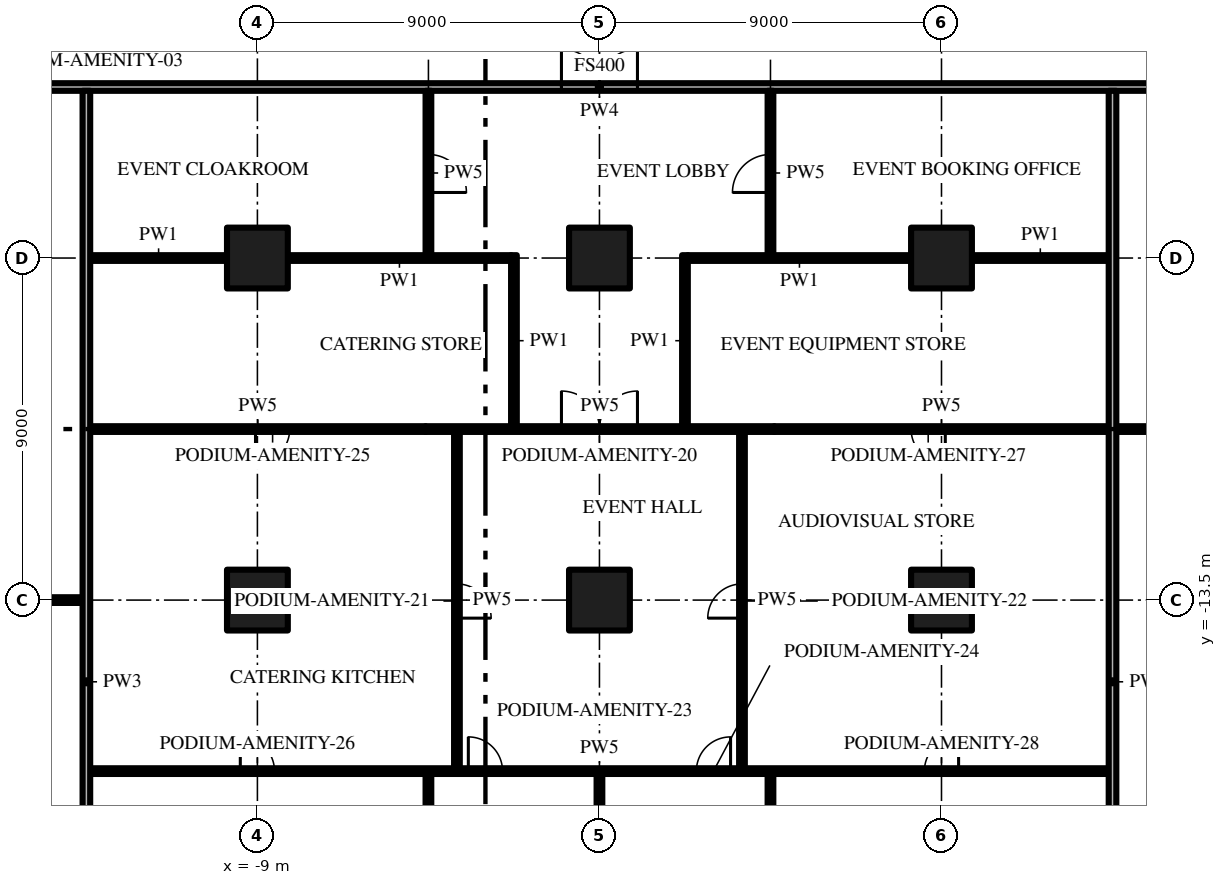
"""IFC4 building model, lengths in metres.
Left out: names, types, materials, properties, quantities, classifications, styles, units other than length and angle.
Written with IfcOpenShell. Run it as: python <this file> out.ifc"""

import sys

from ifc_helpers import new_model, si_unit, direction, frame, frame_2d, origin, origin_2d, place, context, subcontext, project, spatial, rectangle, extrude, element, fill, save


model = new_model("IFC4")
c1 = context("Model", 3, precision=1e-05, world=origin(), true_north=direction((0.0, 1.0)))
c2 = subcontext(c1, "Body", "Model", "MODEL_VIEW")
j1 = project(units=[si_unit("LENGTHUNIT", "METRE"), si_unit("PLANEANGLEUNIT", "RADIAN")], contexts=[c1])
p1 = place(None, origin())
s1 = spatial("IfcSite", under=j1, at=p1, CompositionType="ELEMENT")
p2 = place(p1, origin())
s2 = spatial("IfcBuilding", under=s1, at=p2, CompositionType="ELEMENT")
p3 = place(p2, frame((0.0, 0.0, 6.0)))
s3 = spatial("IfcBuildingStorey", under=s2, at=p3, CompositionType="ELEMENT", Elevation=6.0)
for number, where, z_axis, x_axis in (
    (1, (-9.0, -13.5, 0.0), (0.0, 0.0, 1.0), (1.0, 0.0, 0.0)),
    (2, (-9.0, -4.5, 0.0), (0.0, 0.0, 1.0), (1.0, 0.0, 0.0)),
    (3, (0.0, -13.5, 0.0), (0.0, 0.0, 1.0), (1.0, 0.0, 0.0)),
    (4, (0.0, -4.5, 0.0), (0.0, 0.0, 1.0), (1.0, 0.0, 0.0)),
    (5, (9.0, -13.5, 0.0), (0.0, 0.0, 1.0), (1.0, 0.0, 0.0)),
    (6, (9.0, -4.5, 0.0), (0.0, 0.0, 1.0), (1.0, 0.0, 0.0)),
):
    element("IfcColumn", number, at=place(p3, frame(where, z_axis=z_axis, x_axis=x_axis)), inside=s3, PredefinedType="COLUMN", context=c2, shape_type="SweptSolid", body=[
        extrude(rectangle(XDim=1.6, YDim=1.6, at=origin_2d()), origin(), (0.0, 0.0, 1.0), 4.15),
    ])
p4 = place(p3, frame((-13.4, -18.0, 0.0), z_axis=(0.0, 0.0, 1.0), x_axis=(1.0, 0.0, 0.0)))
e7 = element("IfcWall", 7, at=p4, inside=s3, PredefinedType="PARTITIONING", context=c2, shape_type="SweptSolid", body=[
    extrude(rectangle(XDim=26.8, YDim=0.15, at=frame_2d((13.4, 0.0))), origin(), (0.0, 0.0, 1.0), 4.15),
])
p5 = place(p4, frame((9.95, 0.0, 0.0)))
e8 = element("IfcOpeningElement", 8, at=p5, cuts=e7, PredefinedType="OPENING", context=c2, shape_type="SweptSolid", body=[
    extrude(rectangle(XDim=0.9, YDim=2.1, at=frame_2d((0.45, 1.05))), frame((0.0, 0.085, 0.0), z_axis=(0.0, -1.0, 0.0), x_axis=(1.0, 0.0, 0.0)), (0.0, 0.0, 1.0), 0.17),
])
p6 = place(p4, frame((15.95, 0.0, 0.0)))
e9 = element("IfcOpeningElement", 9, at=p6, cuts=e7, PredefinedType="OPENING", context=c2, shape_type="SweptSolid", body=[
    extrude(rectangle(XDim=0.9, YDim=2.1, at=frame_2d((0.45, 1.05))), frame((0.0, 0.085, 0.0), z_axis=(0.0, -1.0, 0.0), x_axis=(1.0, 0.0, 0.0)), (0.0, 0.0, 1.0), 0.17),
])
p7 = place(p4, frame((3.95, 0.0, 0.0)))
e10 = element("IfcOpeningElement", 10, at=p7, cuts=e7, PredefinedType="OPENING", context=c2, shape_type="SweptSolid", body=[
    extrude(rectangle(XDim=0.9, YDim=2.1, at=frame_2d((0.45, 1.05))), frame((0.0, 0.085, 0.0), z_axis=(0.0, -1.0, 0.0), x_axis=(1.0, 0.0, 0.0)), (0.0, 0.0, 1.0), 0.17),
])
p8 = place(p4, frame((21.95, 0.0, 0.0)))
e11 = element("IfcOpeningElement", 11, at=p8, cuts=e7, PredefinedType="OPENING", context=c2, shape_type="SweptSolid", body=[
    extrude(rectangle(XDim=0.9, YDim=2.1, at=frame_2d((0.45, 1.05))), frame((0.0, 0.085, 0.0), z_axis=(0.0, -1.0, 0.0), x_axis=(1.0, 0.0, 0.0)), (0.0, 0.0, 1.0), 0.17),
])
p9 = place(p3, frame((-17.2, -13.5, 0.0), z_axis=(0.0, 0.0, 1.0), x_axis=(1.0, 0.0, 0.0)))
e12 = element("IfcWall", 12, at=p9, inside=s3, PredefinedType="PARTITIONING", context=c2, shape_type="SweptSolid", body=[
    extrude(rectangle(XDim=3.6, YDim=0.15, at=frame_2d((1.8, 0.0))), origin(), (0.0, 0.0, 1.0), 4.15),
])
p10 = place(p3, frame((-4.575, -9.0, 0.0), z_axis=(0.0, 0.0, 1.0), x_axis=(-1.0, 0.0, 0.0)))
e13 = element("IfcWall", 13, at=p10, inside=s3, PredefinedType="PARTITIONING", context=c2, shape_type="SweptSolid", body=[
    extrude(rectangle(XDim=8.825, YDim=0.15, at=frame_2d((4.412, 0.0))), origin(), (0.0, 0.0, 1.0), 4.15),
])
p11 = place(p10, frame((3.575, 0.0, 0.0)))
e14 = element("IfcOpeningElement", 14, at=p11, cuts=e13, PredefinedType="OPENING", context=c2, shape_type="SweptSolid", body=[
    extrude(rectangle(XDim=0.9, YDim=2.1, at=frame_2d((0.45, 1.05))), frame((0.0, 0.085, 0.0), z_axis=(0.0, -1.0, 0.0), x_axis=(1.0, 0.0, 0.0)), (0.0, 0.0, 1.0), 0.17),
])
p12 = place(p3, frame((-4.575, -9.0, 0.0), z_axis=(0.0, 0.0, 1.0), x_axis=(1.0, 0.0, 0.0)))
e15 = element("IfcWall", 15, at=p12, inside=s3, PredefinedType="PARTITIONING", context=c2, shape_type="SweptSolid", body=[
    extrude(rectangle(XDim=9.175, YDim=0.15, at=frame_2d((4.588, 0.0))), origin(), (0.0, 0.0, 1.0), 4.15),
])
p13 = place(p12, frame((3.575, 0.0, 0.0)))
e16 = element("IfcOpeningElement", 16, at=p13, cuts=e15, PredefinedType="OPENING", context=c2, shape_type="SweptSolid", body=[
    extrude(rectangle(XDim=2.0, YDim=2.4, at=frame_2d((1.0, 1.2))), frame((0.0, 0.085, 0.0), z_axis=(0.0, -1.0, 0.0), x_axis=(1.0, 0.0, 0.0)), (0.0, 0.0, 1.0), 0.17),
])
p14 = place(p3, frame((13.4, -9.0, 0.0), z_axis=(0.0, 0.0, 1.0), x_axis=(-1.0, 0.0, 0.0)))
e17 = element("IfcWall", 17, at=p14, inside=s3, PredefinedType="PARTITIONING", context=c2, shape_type="SweptSolid", body=[
    extrude(rectangle(XDim=8.8, YDim=0.15, at=frame_2d((4.4, 0.0))), origin(), (0.0, 0.0, 1.0), 4.15),
])
p15 = place(p14, frame((4.3, 0.0, 0.0)))
e18 = element("IfcOpeningElement", 18, at=p15, cuts=e17, PredefinedType="OPENING", context=c2, shape_type="SweptSolid", body=[
    extrude(rectangle(XDim=0.9, YDim=2.1, at=frame_2d((0.45, 1.05))), frame((0.0, 0.085, 0.0), z_axis=(0.0, -1.0, 0.0), x_axis=(1.0, 0.0, 0.0)), (0.0, 0.0, 1.0), 0.17),
])
p16 = place(p3, frame((13.6, -9.0, 0.0), z_axis=(0.0, 0.0, 1.0), x_axis=(1.0, 0.0, 0.0)))
e19 = element("IfcWall", 19, at=p16, inside=s3, PredefinedType="PARTITIONING", context=c2, shape_type="SweptSolid", body=[
    extrude(rectangle(XDim=22.1, YDim=0.15, at=frame_2d((11.05, 0.0))), origin(), (0.0, 0.0, 1.0), 4.15),
])
p17 = place(p16, frame((10.65, 0.0, 0.0)))
e20 = element("IfcOpeningElement", 20, at=p17, cuts=e19, PredefinedType="OPENING", context=c2, shape_type="SweptSolid", body=[
    extrude(rectangle(XDim=1.0, YDim=2.4, at=frame_2d((0.5, 1.2))), frame((0.0, 0.085, 0.0), z_axis=(0.0, -1.0, 0.0), x_axis=(1.0, 0.0, 0.0)), (0.0, 0.0, 1.0), 0.17),
])
p18 = place(p3, frame((-13.4, -4.5, 0.0), z_axis=(0.0, 0.0, 1.0), x_axis=(1.0, 0.0, 0.0)))
e21 = element("IfcWall", 21, at=p18, inside=s3, PredefinedType="PARTITIONING", context=c2, shape_type="SweptSolid", body=[
    extrude(rectangle(XDim=3.6, YDim=0.15, at=frame_2d((1.8, 0.0))), origin(), (0.0, 0.0, 1.0), 4.15),
])
for number, where, z_axis, x_axis in (
    (22, (-8.2, -4.5, 0.0), (0.0, 0.0, 1.0), (1.0, 0.0, 0.0)),
    (23, (2.325, -4.5, 0.0), (0.0, 0.0, 1.0), (1.0, 0.0, 0.0)),
):
    element("IfcWall", number, at=place(p3, frame(where, z_axis=z_axis, x_axis=x_axis)), inside=s3, PredefinedType="PARTITIONING", context=c2, shape_type="SweptSolid", body=[
        extrude(rectangle(XDim=5.875, YDim=0.15, at=frame_2d((2.938, 0.0))), origin(), (0.0, 0.0, 1.0), 4.15),
    ])
p19 = place(p3, frame((9.8, -4.5, 0.0), z_axis=(0.0, 0.0, 1.0), x_axis=(1.0, 0.0, 0.0)))
e24 = element("IfcWall", 24, at=p19, inside=s3, PredefinedType="PARTITIONING", context=c2, shape_type="SweptSolid", body=[
    extrude(rectangle(XDim=3.6, YDim=0.15, at=frame_2d((1.8, 0.0))), origin(), (0.0, 0.0, 1.0), 4.15),
])
p20 = place(p3, frame((-17.4, 0.0, 0.0), z_axis=(0.0, 0.0, 1.0), x_axis=(1.0, 0.0, 0.0)))
e25 = element("IfcWall", 25, at=p20, inside=s3, PredefinedType="PARTITIONING", context=c2, shape_type="SweptSolid", body=[
    extrude(rectangle(XDim=34.8, YDim=0.2, at=frame_2d((17.4, 0.0))), origin(), (0.0, 0.0, 1.0), 4.15),
])
p21 = place(p20, frame((0.9, 0.0, 0.0)))
e26 = element("IfcOpeningElement", 26, at=p21, cuts=e25, PredefinedType="OPENING", context=c2, shape_type="SweptSolid", body=[
    extrude(rectangle(XDim=2.0, YDim=2.4, at=frame_2d((1.0, 1.2))), frame((0.0, 0.11, 0.0), z_axis=(0.0, -1.0, 0.0), x_axis=(1.0, 0.0, 0.0)), (0.0, 0.0, 1.0), 0.22),
])
p22 = place(p20, frame((16.4, 0.0, 0.0)))
e27 = element("IfcOpeningElement", 27, at=p22, cuts=e25, PredefinedType="OPENING", context=c2, shape_type="SweptSolid", body=[
    extrude(rectangle(XDim=2.0, YDim=2.4, at=frame_2d((1.0, 1.2))), frame((0.0, 0.11, 0.0), z_axis=(0.0, -1.0, 0.0), x_axis=(1.0, 0.0, 0.0)), (0.0, 0.0, 1.0), 0.22),
])
p23 = place(p20, frame((32.0, 0.0, 0.0)))
e28 = element("IfcOpeningElement", 28, at=p23, cuts=e25, PredefinedType="OPENING", context=c2, shape_type="SweptSolid", body=[
    extrude(rectangle(XDim=1.8, YDim=2.4, at=frame_2d((0.9, 1.2))), frame((0.0, 0.11, 0.0), z_axis=(0.0, -1.0, 0.0), x_axis=(1.0, 0.0, 0.0)), (0.0, 0.0, 1.0), 0.22),
])
p24 = place(p3, frame((-13.5, -31.2, 0.0), z_axis=(0.0, 0.0, 1.0), x_axis=(0.0, 1.0, 0.0)))
e29 = element("IfcWall", 29, at=p24, inside=s3, PredefinedType="PARTITIONING", context=c2, shape_type="SweptSolid", body=[
    extrude(rectangle(XDim=31.1, YDim=0.2, at=frame_2d((15.55, 0.0))), origin(), (0.0, 0.0, 1.0), 4.15),
])
p25 = place(p3, frame((-4.5, -31.2, 0.0), z_axis=(0.0, 0.0, 1.0), x_axis=(0.0, 1.0, 0.0)))
e30 = element("IfcWall", 30, at=p25, inside=s3, PredefinedType="PARTITIONING", context=c2, shape_type="SweptSolid", body=[
    extrude(rectangle(XDim=13.125, YDim=0.15, at=frame_2d((6.562, 0.0))), origin(), (0.0, 0.0, 1.0), 4.15),
])
p26 = place(p3, frame((-4.5, -0.1, 0.0), z_axis=(0.0, 0.0, 1.0), x_axis=(0.0, -1.0, 0.0)))
e31 = element("IfcWall", 31, at=p26, inside=s3, PredefinedType="PARTITIONING", context=c2, shape_type="SweptSolid", body=[
    extrude(rectangle(XDim=4.325, YDim=0.15, at=frame_2d((2.163, 0.0))), origin(), (0.0, 0.0, 1.0), 4.15),
])
p27 = place(p26, frame((1.675, 0.0, 0.0)))
e32 = element("IfcOpeningElement", 32, at=p27, cuts=e31, PredefinedType="OPENING", context=c2, shape_type="SweptSolid", body=[
    extrude(rectangle(XDim=1.0, YDim=2.4, at=frame_2d((0.5, 1.2))), frame((0.0, 0.085, 0.0), z_axis=(0.0, -1.0, 0.0), x_axis=(1.0, 0.0, 0.0)), (0.0, 0.0, 1.0), 0.17),
])
p28 = place(p3, frame((-3.75, -9.075, 0.0), z_axis=(0.0, 0.0, 1.0), x_axis=(0.0, -1.0, 0.0)))
e33 = element("IfcWall", 33, at=p28, inside=s3, PredefinedType="PARTITIONING", context=c2, shape_type="SweptSolid", body=[
    extrude(rectangle(XDim=8.85, YDim=0.15, at=frame_2d((4.425, 0.0))), origin(), (0.0, 0.0, 1.0), 4.15),
])
p29 = place(p28, frame((4.0, 0.0, 0.0)))
e34 = element("IfcOpeningElement", 34, at=p29, cuts=e33, PredefinedType="OPENING", context=c2, shape_type="SweptSolid", body=[
    extrude(rectangle(XDim=0.9, YDim=2.1, at=frame_2d((0.45, 1.05))), frame((0.0, 0.085, 0.0), z_axis=(0.0, -1.0, 0.0), x_axis=(1.0, 0.0, 0.0)), (0.0, 0.0, 1.0), 0.17),
])
p30 = place(p3, frame((-2.25, -8.925, 0.0), z_axis=(0.0, 0.0, 1.0), x_axis=(0.0, 1.0, 0.0)))
e35 = element("IfcWall", 35, at=p30, inside=s3, PredefinedType="PARTITIONING", context=c2, shape_type="SweptSolid", body=[
    extrude(rectangle(XDim=4.5, YDim=0.15, at=frame_2d((2.25, 0.0))), origin(), (0.0, 0.0, 1.0), 4.15),
])
p31 = place(p3, frame((0.0, -21.0, 0.0), z_axis=(0.0, 0.0, 1.0), x_axis=(0.0, 1.0, 0.0)))
e36 = element("IfcWall", 36, at=p31, inside=s3, PredefinedType="PARTITIONING", context=c2, shape_type="SweptSolid", body=[
    extrude(rectangle(XDim=2.925, YDim=0.15, at=frame_2d((1.462, 0.0))), origin(), (0.0, 0.0, 1.0), 4.15),
])
p32 = place(p3, frame((2.25, -8.925, 0.0), z_axis=(0.0, 0.0, 1.0), x_axis=(0.0, 1.0, 0.0)))
e37 = element("IfcWall", 37, at=p32, inside=s3, PredefinedType="PARTITIONING", context=c2, shape_type="SweptSolid", body=[
    extrude(rectangle(XDim=4.5, YDim=0.15, at=frame_2d((2.25, 0.0))), origin(), (0.0, 0.0, 1.0), 4.15),
])
p33 = place(p3, frame((3.75, -17.925, 0.0), z_axis=(0.0, 0.0, 1.0), x_axis=(0.0, 1.0, 0.0)))
e38 = element("IfcWall", 38, at=p33, inside=s3, PredefinedType="PARTITIONING", context=c2, shape_type="SweptSolid", body=[
    extrude(rectangle(XDim=8.85, YDim=0.15, at=frame_2d((4.425, 0.0))), origin(), (0.0, 0.0, 1.0), 4.15),
])
p34 = place(p33, frame((3.95, 0.0, 0.0)))
e39 = element("IfcOpeningElement", 39, at=p34, cuts=e38, PredefinedType="OPENING", context=c2, shape_type="SweptSolid", body=[
    extrude(rectangle(XDim=0.9, YDim=2.1, at=frame_2d((0.45, 1.05))), frame((0.0, 0.085, 0.0), z_axis=(0.0, -1.0, 0.0), x_axis=(1.0, 0.0, 0.0)), (0.0, 0.0, 1.0), 0.17),
])
p35 = place(p3, frame((4.5, -31.2, 0.0), z_axis=(0.0, 0.0, 1.0), x_axis=(0.0, 1.0, 0.0)))
e40 = element("IfcWall", 40, at=p35, inside=s3, PredefinedType="PARTITIONING", context=c2, shape_type="SweptSolid", body=[
    extrude(rectangle(XDim=13.125, YDim=0.15, at=frame_2d((6.562, 0.0))), origin(), (0.0, 0.0, 1.0), 4.15),
])
p36 = place(p3, frame((4.5, -4.425, 0.0), z_axis=(0.0, 0.0, 1.0), x_axis=(0.0, 1.0, 0.0)))
e41 = element("IfcWall", 41, at=p36, inside=s3, PredefinedType="PARTITIONING", context=c2, shape_type="SweptSolid", body=[
    extrude(rectangle(XDim=4.325, YDim=0.15, at=frame_2d((2.163, 0.0))), origin(), (0.0, 0.0, 1.0), 4.15),
])
p37 = place(p36, frame((1.65, 0.0, 0.0)))
e42 = element("IfcOpeningElement", 42, at=p37, cuts=e41, PredefinedType="OPENING", context=c2, shape_type="SweptSolid", body=[
    extrude(rectangle(XDim=1.0, YDim=2.4, at=frame_2d((0.5, 1.2))), frame((0.0, 0.085, 0.0), z_axis=(0.0, -1.0, 0.0), x_axis=(1.0, 0.0, 0.0)), (0.0, 0.0, 1.0), 0.17),
])
p38 = place(p3, frame((13.5, -31.2, 0.0), z_axis=(0.0, 0.0, 1.0), x_axis=(0.0, 1.0, 0.0)))
e43 = element("IfcWall", 43, at=p38, inside=s3, PredefinedType="PARTITIONING", context=c2, shape_type="SweptSolid", body=[
    extrude(rectangle(XDim=31.1, YDim=0.2, at=frame_2d((15.55, 0.0))), origin(), (0.0, 0.0, 1.0), 4.15),
])
p39 = place(p22, origin())
e44 = element("IfcDoor", 44, at=p39, inside=s3, OperationType="DOUBLE_DOOR_SINGLE_SWING", PredefinedType="DOOR", context=c2, shape_type="SweptSolid", body=[
    extrude(rectangle(XDim=2.0, YDim=2.4, at=frame_2d((1.0, 1.2))), frame((0.0, 0.025, 0.0), z_axis=(0.0, -1.0, 0.0), x_axis=(1.0, 0.0, 0.0)), (0.0, 0.0, 1.0), 0.05),
])
fill(e27, e44)
p40 = place(p27, origin())
e45 = element("IfcDoor", 45, at=p40, inside=s3, OperationType="SINGLE_SWING_RIGHT", PredefinedType="DOOR", context=c2, shape_type="SweptSolid", body=[
    extrude(rectangle(XDim=1.0, YDim=2.4, at=frame_2d((0.5, 1.2))), frame((0.0, 0.025, 0.0), z_axis=(0.0, -1.0, 0.0), x_axis=(1.0, 0.0, 0.0)), (0.0, 0.0, 1.0), 0.05),
])
fill(e32, e45)
p41 = place(p37, origin())
e46 = element("IfcDoor", 46, at=p41, inside=s3, OperationType="SINGLE_SWING_LEFT", PredefinedType="DOOR", context=c2, shape_type="SweptSolid", body=[
    extrude(rectangle(XDim=1.0, YDim=2.4, at=frame_2d((0.5, 1.2))), frame((0.0, 0.025, 0.0), z_axis=(0.0, -1.0, 0.0), x_axis=(1.0, 0.0, 0.0)), (0.0, 0.0, 1.0), 0.05),
])
fill(e42, e46)
p42 = place(p13, origin())
e47 = element("IfcDoor", 47, at=p42, inside=s3, OperationType="DOUBLE_DOOR_SINGLE_SWING", PredefinedType="DOOR", context=c2, shape_type="SweptSolid", body=[
    extrude(rectangle(XDim=2.0, YDim=2.4, at=frame_2d((1.0, 1.2))), frame((0.0, 0.025, 0.0), z_axis=(0.0, -1.0, 0.0), x_axis=(1.0, 0.0, 0.0)), (0.0, 0.0, 1.0), 0.05),
])
fill(e16, e47)
p43 = place(p29, origin())
e48 = element("IfcDoor", 48, at=p43, inside=s3, OperationType="SINGLE_SWING_RIGHT", PredefinedType="DOOR", context=c2, shape_type="SweptSolid", body=[
    extrude(rectangle(XDim=0.9, YDim=2.1, at=frame_2d((0.45, 1.05))), frame((0.0, 0.025, 0.0), z_axis=(0.0, -1.0, 0.0), x_axis=(1.0, 0.0, 0.0)), (0.0, 0.0, 1.0), 0.05),
])
fill(e34, e48)
p44 = place(p34, origin())
e49 = element("IfcDoor", 49, at=p44, inside=s3, OperationType="SINGLE_SWING_LEFT", PredefinedType="DOOR", context=c2, shape_type="SweptSolid", body=[
    extrude(rectangle(XDim=0.9, YDim=2.1, at=frame_2d((0.45, 1.05))), frame((0.0, 0.025, 0.0), z_axis=(0.0, -1.0, 0.0), x_axis=(1.0, 0.0, 0.0)), (0.0, 0.0, 1.0), 0.05),
])
fill(e39, e49)
p45 = place(p5, origin())
e50 = element("IfcDoor", 50, at=p45, inside=s3, OperationType="SINGLE_SWING_LEFT", PredefinedType="DOOR", context=c2, shape_type="SweptSolid", body=[
    extrude(rectangle(XDim=0.9, YDim=2.1, at=frame_2d((0.45, 1.05))), frame((0.0, 0.025, 0.0), z_axis=(0.0, -1.0, 0.0), x_axis=(1.0, 0.0, 0.0)), (0.0, 0.0, 1.0), 0.05),
])
fill(e8, e50)
p46 = place(p6, origin())
e51 = element("IfcDoor", 51, at=p46, inside=s3, OperationType="SINGLE_SWING_RIGHT", PredefinedType="DOOR", context=c2, shape_type="SweptSolid", body=[
    extrude(rectangle(XDim=0.9, YDim=2.1, at=frame_2d((0.45, 1.05))), frame((0.0, 0.025, 0.0), z_axis=(0.0, -1.0, 0.0), x_axis=(1.0, 0.0, 0.0)), (0.0, 0.0, 1.0), 0.05),
])
fill(e9, e51)
p47 = place(p11, origin())
e52 = element("IfcDoor", 52, at=p47, inside=s3, OperationType="SINGLE_SWING_RIGHT", PredefinedType="DOOR", context=c2, shape_type="SweptSolid", body=[
    extrude(rectangle(XDim=0.9, YDim=2.1, at=frame_2d((0.45, 1.05))), frame((0.0, 0.025, 0.0), z_axis=(0.0, -1.0, 0.0), x_axis=(1.0, 0.0, 0.0)), (0.0, 0.0, 1.0), 0.05),
])
fill(e14, e52)
p48 = place(p7, origin())
e53 = element("IfcDoor", 53, at=p48, inside=s3, OperationType="SINGLE_SWING_LEFT", PredefinedType="DOOR", context=c2, shape_type="SweptSolid", body=[
    extrude(rectangle(XDim=0.9, YDim=2.1, at=frame_2d((0.45, 1.05))), frame((0.0, 0.025, 0.0), z_axis=(0.0, -1.0, 0.0), x_axis=(1.0, 0.0, 0.0)), (0.0, 0.0, 1.0), 0.05),
])
fill(e10, e53)
p49 = place(p15, origin())
e54 = element("IfcDoor", 54, at=p49, inside=s3, OperationType="SINGLE_SWING_LEFT", PredefinedType="DOOR", context=c2, shape_type="SweptSolid", body=[
    extrude(rectangle(XDim=0.9, YDim=2.1, at=frame_2d((0.45, 1.05))), frame((0.0, 0.025, 0.0), z_axis=(0.0, -1.0, 0.0), x_axis=(1.0, 0.0, 0.0)), (0.0, 0.0, 1.0), 0.05),
])
fill(e18, e54)
p50 = place(p8, origin())
e55 = element("IfcDoor", 55, at=p50, inside=s3, OperationType="SINGLE_SWING_RIGHT", PredefinedType="DOOR", context=c2, shape_type="SweptSolid", body=[
    extrude(rectangle(XDim=0.9, YDim=2.1, at=frame_2d((0.45, 1.05))), frame((0.0, 0.025, 0.0), z_axis=(0.0, -1.0, 0.0), x_axis=(1.0, 0.0, 0.0)), (0.0, 0.0, 1.0), 0.05),
])
fill(e11, e55)
save(model, sys.argv[1])
